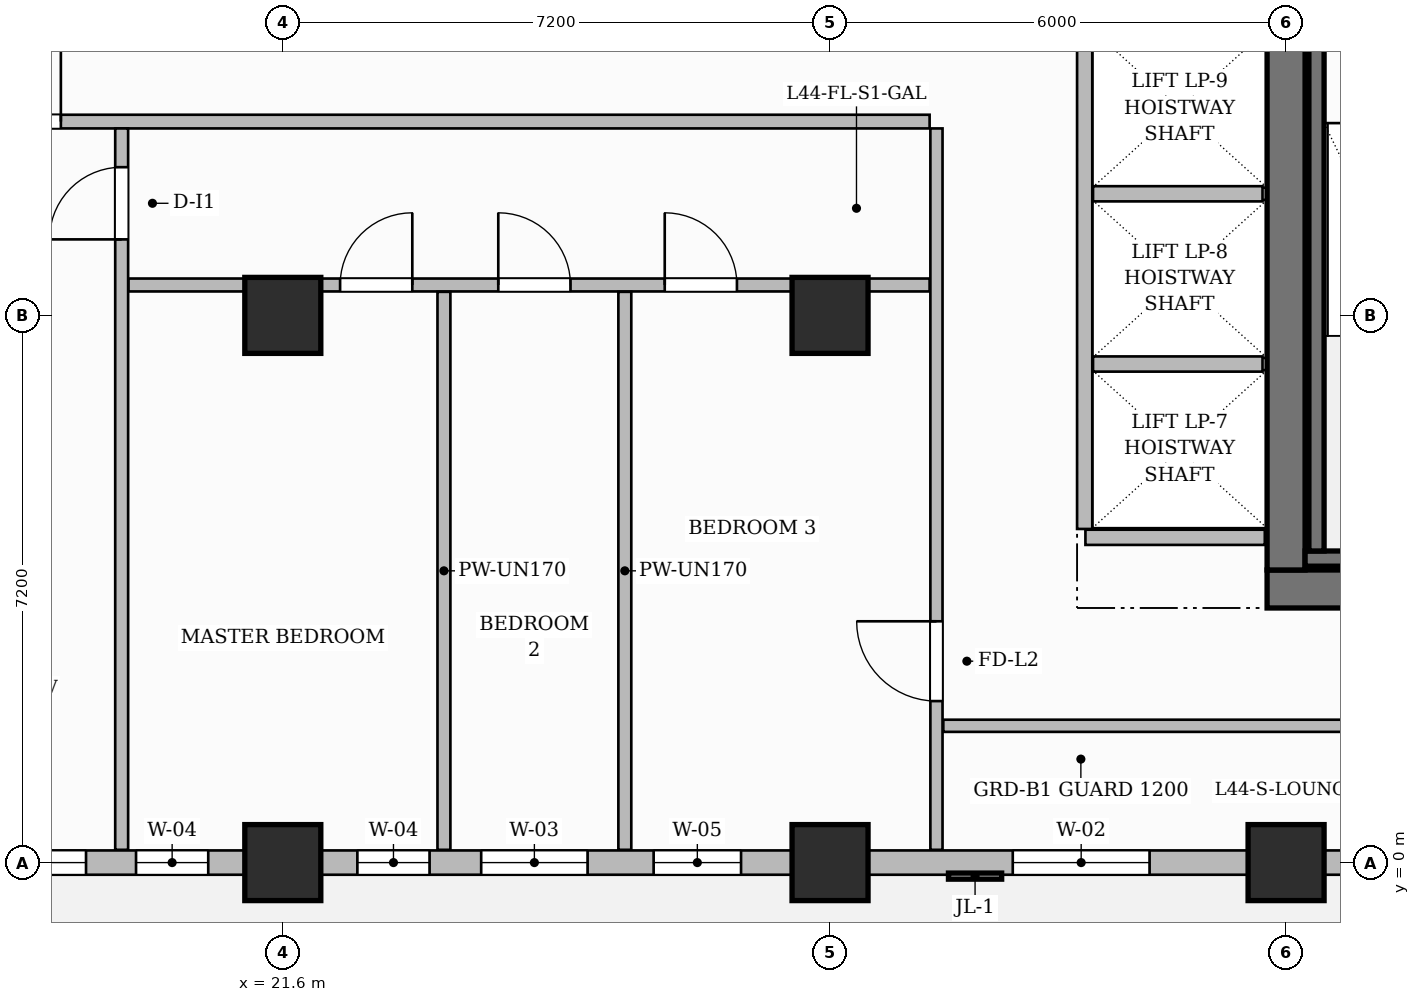
"""IFC4 building model, lengths in metres.
Left out: names, types, materials, properties, quantities, classifications, styles, units other than length and angle.
Written with IfcOpenShell. Run it as: python <this file> out.ifc"""

import sys

from ifc_helpers import new_model, si_unit, direction, frame, frame_2d, origin, origin_2d, place, context, subcontext, project, spatial, rectangle, extrude, source, transform, mapped, element, fill, save


model = new_model("IFC4")
c1 = context("Model", 3, precision=1e-05, world=origin(), true_north=direction((0.0, 1.0)))
c2 = subcontext(c1, "Body", "Model", "MODEL_VIEW")
j1 = project(units=[si_unit("LENGTHUNIT", "METRE"), si_unit("PLANEANGLEUNIT", "RADIAN")], contexts=[c1])
p1 = place(None, origin())
s1 = spatial("IfcSite", under=j1, at=p1, CompositionType="ELEMENT")
p2 = place(p1, origin())
s2 = spatial("IfcBuilding", under=s1, at=p2, CompositionType="ELEMENT")
p3 = place(p2, frame((0.0, 0.0, 177.25)))
s3 = spatial("IfcBuildingStorey", under=s2, at=p3, CompositionType="ELEMENT", Elevation=177.25)
p4 = place(p3, frame((34.55, 3.6, 0.0), z_axis=(0.0, 0.0, 1.0), x_axis=(1.0, 0.0, 0.0)))
e1 = element("IfcWall", 1, at=p4, inside=s3, PredefinedType="SHEAR", context=c2, shape_type="SweptSolid", body=[
    extrude(rectangle(XDim=15.5, YDim=0.5, at=frame_2d((7.75, 0.0))), origin(), (0.0, 0.0, 1.0), 3.85),
])
p5 = place(p4, frame((4.72, 0.0, 0.0)))
e2 = element("IfcOpeningElement", 2, at=p5, cuts=e1, PredefinedType="OPENING", context=c2, shape_type="SweptSolid", body=[
    extrude(rectangle(XDim=0.9, YDim=2.1, at=frame_2d((0.45, 1.05))), frame((0.0, 0.26, 0.0), z_axis=(0.0, -1.0, 0.0), x_axis=(1.0, 0.0, 0.0)), (0.0, 0.0, 1.0), 0.52),
])
p6 = place(p4, frame((7.1, 0.0, 0.0)))
e3 = element("IfcOpeningElement", 3, at=p6, cuts=e1, PredefinedType="OPENING", context=c2, shape_type="SweptSolid", body=[
    extrude(rectangle(XDim=0.9, YDim=2.1, at=frame_2d((0.45, 1.05))), frame((0.0, 0.26, 0.0), z_axis=(0.0, -1.0, 0.0), x_axis=(1.0, 0.0, 0.0)), (0.0, 0.0, 1.0), 0.52),
])
p7 = place(p3, frame((34.8, 3.85, 0.0), z_axis=(0.0, 0.0, 1.0), x_axis=(0.0, 1.0, 0.0)))
e4 = element("IfcWall", 4, at=p7, inside=s3, PredefinedType="SHEAR", context=c2, shape_type="SweptSolid", body=[
    extrude(rectangle(XDim=10.3, YDim=0.5, at=frame_2d((5.15, 0.0))), origin(), (0.0, 0.0, 1.0), 3.85),
])
m1 = source(origin(), c2, "Body", "SweptSolid", [
    extrude(rectangle(XDim=1.0, YDim=1.0, at=origin_2d()), origin(), (0.0, 0.0, 1.0), 3.85),
])
for number, where, z_axis, x_axis in (
    (5, (21.6, 0.0, 0.0), (0.0, 0.0, 1.0), (1.0, 0.0, 0.0)),
    (6, (21.6, 7.2, 0.0), (0.0, 0.0, 1.0), (1.0, 0.0, 0.0)),
    (7, (28.8, 0.0, 0.0), (0.0, 0.0, 1.0), (1.0, 0.0, 0.0)),
    (8, (28.8, 7.2, 0.0), (0.0, 0.0, 1.0), (1.0, 0.0, 0.0)),
    (9, (34.8, 0.0, 0.0), (0.0, 0.0, 1.0), (1.0, 0.0, 0.0)),
):
    element("IfcColumn", number, at=place(p3, frame(where, z_axis=z_axis, x_axis=x_axis)), inside=s3, PredefinedType="COLUMN", context=c2, shape_type="MappedRepresentation", body=[
        mapped(m1, transform((0.0, 0.0, 0.0), scale=1.0)),
    ])
p8 = place(p3, frame((35.05, 4.0, 0.0), z_axis=(0.0, 0.0, 1.0), x_axis=(1.0, 0.0, 0.0)))
e10 = element("IfcWall", 10, at=p8, inside=s3, PredefinedType="SHEAR", context=c2, shape_type="SweptSolid", body=[
    extrude(rectangle(XDim=3.19, YDim=0.2, at=frame_2d((1.595, 0.0))), origin(), (0.0, 0.0, 1.0), 3.85),
])
p9 = place(p3, frame((35.2, 4.1, 0.0), z_axis=(0.0, 0.0, 1.0), x_axis=(0.0, 1.0, 0.0)))
e11 = element("IfcWall", 11, at=p9, inside=s3, PredefinedType="SHEAR", context=c2, shape_type="SweptSolid", body=[
    extrude(rectangle(XDim=6.95, YDim=0.2, at=frame_2d((3.475, 0.0))), origin(), (0.0, 0.0, 1.0), 3.85),
])
p10 = place(p3, frame((32.16, 4.28, 0.0), z_axis=(0.0, 0.0, 1.0), x_axis=(1.0, 0.0, 0.0)))
e12 = element("IfcWall", 12, at=p10, inside=s3, PredefinedType="PARTITIONING", context=c2, shape_type="SweptSolid", body=[
    extrude(rectangle(XDim=2.36, YDim=0.2, at=frame_2d((1.18, 0.0))), origin(), (0.0, 0.0, 1.0), 3.6),
])
p11 = place(p3, frame((32.15, 4.39, 0.0), z_axis=(0.0, 0.0, 1.0), x_axis=(0.0, 1.0, 0.0)))
e13 = element("IfcWall", 13, at=p11, inside=s3, PredefinedType="PARTITIONING", context=c2, shape_type="SweptSolid", body=[
    extrude(rectangle(XDim=8.82, YDim=0.2, at=frame_2d((4.41, 0.0))), origin(), (0.0, 0.0, 1.0), 3.6),
])
for number, where, z_axis, x_axis in (
    (14, (32.26, 6.56, 0.0), (0.0, 0.0, 1.0), (1.0, 0.0, 0.0)),
    (15, (32.26, 8.8, 0.0), (0.0, 0.0, 1.0), (1.0, 0.0, 0.0)),
):
    element("IfcWall", number, at=place(p3, frame(where, z_axis=z_axis, x_axis=x_axis)), inside=s3, PredefinedType="PARTITIONING", context=c2, shape_type="SweptSolid", body=[
        extrude(rectangle(XDim=2.23, YDim=0.2, at=frame_2d((1.115, 0.0))), origin(), (0.0, 0.0, 1.0), 3.6),
    ])
p12 = place(p3, frame((14.568, 9.75, 0.0), z_axis=(0.0, 0.0, 1.0), x_axis=(1.0, 0.0, 0.0)))
e16 = element("IfcWall", 16, at=p12, inside=s3, PredefinedType="PARTITIONING", context=c2, shape_type="SweptSolid", body=[
    extrude(rectangle(XDim=15.542, YDim=0.18, at=frame_2d((7.771, 0.0))), origin(), (0.0, 0.0, 1.0), 3.6),
])
p13 = place(p12, frame((3.062, 0.0, 0.0)))
e17 = element("IfcOpeningElement", 17, at=p13, cuts=e16, PredefinedType="OPENING", context=c2, shape_type="SweptSolid", body=[
    extrude(rectangle(XDim=1.05, YDim=2.25, at=frame_2d((0.525, 1.125))), frame((0.0, 0.1, 0.0), z_axis=(0.0, -1.0, 0.0), x_axis=(1.0, 0.0, 0.0)), (0.0, 0.0, 1.0), 0.2),
])
p14 = place(p3, frame((30.2, 0.168, 0.0), z_axis=(0.0, 0.0, 1.0), x_axis=(0.0, 1.0, 0.0)))
e18 = element("IfcWall", 18, at=p14, inside=s3, PredefinedType="PARTITIONING", context=c2, shape_type="SweptSolid", body=[
    extrude(rectangle(XDim=9.492, YDim=0.16, at=frame_2d((4.746, 0.0))), origin(), (0.0, 0.0, 1.0), 3.6),
])
p15 = place(p14, frame((1.957, 0.0, 0.0)))
e19 = element("IfcOpeningElement", 19, at=p15, cuts=e18, PredefinedType="OPENING", context=c2, shape_type="SweptSolid", body=[
    extrude(rectangle(XDim=1.05, YDim=2.15, at=frame_2d((0.525, 1.075))), frame((0.0, 0.09, 0.0), z_axis=(0.0, -1.0, 0.0), x_axis=(1.0, 0.0, 0.0)), (0.0, 0.0, 1.0), 0.18),
])
p16 = place(p3, frame((30.29, 1.8, 0.0), z_axis=(0.0, 0.0, 1.0), x_axis=(1.0, 0.0, 0.0)))
e20 = element("IfcWall", 20, at=p16, inside=s3, PredefinedType="PARTITIONING", context=c2, shape_type="SweptSolid", body=[
    extrude(rectangle(XDim=19.37, YDim=0.16, at=frame_2d((9.685, 0.0))), origin(), (0.0, 0.0, 1.0), 3.6),
])
p17 = place(p16, frame((9.735, 0.0, 0.0)))
e21 = element("IfcOpeningElement", 21, at=p17, cuts=e20, PredefinedType="OPENING", context=c2, shape_type="SweptSolid", body=[
    extrude(rectangle(XDim=0.95, YDim=2.15, at=frame_2d((0.475, 1.075))), frame((0.0, 0.09, 0.0), z_axis=(0.0, -1.0, 0.0), x_axis=(1.0, 0.0, 0.0)), (0.0, 0.0, 1.0), 0.18),
])
p18 = place(p3, frame((19.48, 0.168, 0.0), z_axis=(0.0, 0.0, 1.0), x_axis=(0.0, 1.0, 0.0)))
e22 = element("IfcWall", 22, at=p18, inside=s3, PredefinedType="PARTITIONING", context=c2, shape_type="SweptSolid", body=[
    extrude(rectangle(XDim=9.492, YDim=0.17, at=frame_2d((4.746, 0.0))), origin(), (0.0, 0.0, 1.0), 3.6),
])
p19 = place(p18, frame((8.032, 0.0, 0.0)))
e23 = element("IfcOpeningElement", 23, at=p19, cuts=e22, PredefinedType="OPENING", context=c2, shape_type="SweptSolid", body=[
    extrude(rectangle(XDim=0.95, YDim=2.15, at=frame_2d((0.475, 1.075))), frame((0.0, 0.095, 0.0), z_axis=(0.0, -1.0, 0.0), x_axis=(1.0, 0.0, 0.0)), (0.0, 0.0, 1.0), 0.19),
])
p20 = place(p3, frame((19.57, 7.6, 0.0), z_axis=(0.0, 0.0, 1.0), x_axis=(1.0, 0.0, 0.0)))
e24 = element("IfcWall", 24, at=p20, inside=s3, PredefinedType="PARTITIONING", context=c2, shape_type="SweptSolid", body=[
    extrude(rectangle(XDim=10.54, YDim=0.17, at=frame_2d((5.27, 0.0))), origin(), (0.0, 0.0, 1.0), 3.6),
])
p21 = place(p20, frame((2.784, 0.0, 0.0)))
e25 = element("IfcOpeningElement", 25, at=p21, cuts=e24, PredefinedType="OPENING", context=c2, shape_type="SweptSolid", body=[
    extrude(rectangle(XDim=0.95, YDim=2.15, at=frame_2d((0.475, 1.075))), frame((0.0, 0.095, 0.0), z_axis=(0.0, -1.0, 0.0), x_axis=(1.0, 0.0, 0.0)), (0.0, 0.0, 1.0), 0.19),
])
p22 = place(p20, frame((4.865, 0.0, 0.0)))
e26 = element("IfcOpeningElement", 26, at=p22, cuts=e24, PredefinedType="OPENING", context=c2, shape_type="SweptSolid", body=[
    extrude(rectangle(XDim=0.95, YDim=2.15, at=frame_2d((0.475, 1.075))), frame((0.0, 0.095, 0.0), z_axis=(0.0, -1.0, 0.0), x_axis=(1.0, 0.0, 0.0)), (0.0, 0.0, 1.0), 0.19),
])
p23 = place(p20, frame((7.055, 0.0, 0.0)))
e27 = element("IfcOpeningElement", 27, at=p23, cuts=e24, PredefinedType="OPENING", context=c2, shape_type="SweptSolid", body=[
    extrude(rectangle(XDim=0.95, YDim=2.15, at=frame_2d((0.475, 1.075))), frame((0.0, 0.095, 0.0), z_axis=(0.0, -1.0, 0.0), x_axis=(1.0, 0.0, 0.0)), (0.0, 0.0, 1.0), 0.19),
])
for number, where, z_axis, x_axis in (
    (28, (23.72, 0.168, 0.0), (0.0, 0.0, 1.0), (0.0, 1.0, 0.0)),
    (29, (26.1, 0.168, 0.0), (0.0, 0.0, 1.0), (0.0, 1.0, 0.0)),
):
    element("IfcWall", number, at=place(p3, frame(where, z_axis=z_axis, x_axis=x_axis)), inside=s3, PredefinedType="PARTITIONING", context=c2, shape_type="SweptSolid", body=[
        extrude(rectangle(XDim=7.342, YDim=0.17, at=frame_2d((3.671, 0.0))), origin(), (0.0, 0.0, 1.0), 3.6),
    ])
p24 = place(p3, frame((14.4, 0.0, 0.0), z_axis=(0.0, 0.0, 1.0), x_axis=(1.0, 0.0, 0.0)))
e30 = element("IfcWall", 30, at=p24, inside=s3, PredefinedType="SOLIDWALL", context=c2, shape_type="SweptSolid", body=[
    extrude(rectangle(XDim=35.4, YDim=0.32, at=frame_2d((17.7, 0.0))), origin(), (0.0, 0.0, 1.0), 3.085),
])
p25 = place(p24, frame((0.85, 0.0, 0.0)))
e31 = element("IfcOpeningElement", 31, at=p25, cuts=e30, PredefinedType="OPENING", context=c2, shape_type="SweptSolid", body=[
    extrude(rectangle(XDim=1.2, YDim=2.2, at=frame_2d((0.6, 1.1))), frame((0.0, 0.17, 0.0), z_axis=(0.0, -1.0, 0.0), x_axis=(1.0, 0.0, 0.0)), (0.0, 0.0, 1.0), 0.34),
])
p26 = place(p24, frame((2.811, 0.0, 0.8)))
e32 = element("IfcOpeningElement", 32, at=p26, cuts=e30, PredefinedType="OPENING", context=c2, shape_type="SweptSolid", body=[
    extrude(rectangle(XDim=1.8, YDim=1.85, at=frame_2d((0.9, 0.925))), frame((0.0, 0.17, 0.0), z_axis=(0.0, -1.0, 0.0), x_axis=(1.0, 0.0, 0.0)), (0.0, 0.0, 1.0), 0.34),
])
p27 = place(p24, frame((5.269, 0.0, 0.8)))
e33 = element("IfcOpeningElement", 33, at=p27, cuts=e30, PredefinedType="OPENING", context=c2, shape_type="SweptSolid", body=[
    extrude(rectangle(XDim=0.95, YDim=1.75, at=frame_2d((0.475, 0.875))), frame((0.0, 0.17, 0.0), z_axis=(0.0, -1.0, 0.0), x_axis=(1.0, 0.0, 0.0)), (0.0, 0.0, 1.0), 0.34),
])
p28 = place(p24, frame((8.181, 0.0, 0.8)))
e34 = element("IfcOpeningElement", 34, at=p28, cuts=e30, PredefinedType="OPENING", context=c2, shape_type="SweptSolid", body=[
    extrude(rectangle(XDim=0.95, YDim=1.75, at=frame_2d((0.475, 0.875))), frame((0.0, 0.17, 0.0), z_axis=(0.0, -1.0, 0.0), x_axis=(1.0, 0.0, 0.0)), (0.0, 0.0, 1.0), 0.34),
])
p29 = place(p24, frame((9.81, 0.0, 0.8)))
e35 = element("IfcOpeningElement", 35, at=p29, cuts=e30, PredefinedType="OPENING", context=c2, shape_type="SweptSolid", body=[
    extrude(rectangle(XDim=1.4, YDim=1.85, at=frame_2d((0.7, 0.925))), frame((0.0, 0.17, 0.0), z_axis=(0.0, -1.0, 0.0), x_axis=(1.0, 0.0, 0.0)), (0.0, 0.0, 1.0), 0.34),
])
p30 = place(p24, frame((12.079, 0.0, 0.8)))
e36 = element("IfcOpeningElement", 36, at=p30, cuts=e30, PredefinedType="OPENING", context=c2, shape_type="SweptSolid", body=[
    extrude(rectangle(XDim=1.15, YDim=1.8, at=frame_2d((0.575, 0.9))), frame((0.0, 0.17, 0.0), z_axis=(0.0, -1.0, 0.0), x_axis=(1.0, 0.0, 0.0)), (0.0, 0.0, 1.0), 0.34),
])
p31 = place(p24, frame((16.804, 0.0, 0.8)))
e37 = element("IfcOpeningElement", 37, at=p31, cuts=e30, PredefinedType="OPENING", context=c2, shape_type="SweptSolid", body=[
    extrude(rectangle(XDim=1.8, YDim=1.85, at=frame_2d((0.9, 0.925))), frame((0.0, 0.17, 0.0), z_axis=(0.0, -1.0, 0.0), x_axis=(1.0, 0.0, 0.0)), (0.0, 0.0, 1.0), 0.34),
])
p32 = place(p24, frame((21.725, 0.0, 0.8)))
e38 = element("IfcOpeningElement", 38, at=p32, cuts=e30, PredefinedType="OPENING", context=c2, shape_type="SweptSolid", body=[
    extrude(rectangle(XDim=1.8, YDim=1.85, at=frame_2d((0.9, 0.925))), frame((0.0, 0.17, 0.0), z_axis=(0.0, -1.0, 0.0), x_axis=(1.0, 0.0, 0.0)), (0.0, 0.0, 1.0), 0.34),
])
p33 = place(p24, frame((24.475, 0.0, 0.8)))
e39 = element("IfcOpeningElement", 39, at=p33, cuts=e30, PredefinedType="OPENING", context=c2, shape_type="SweptSolid", body=[
    extrude(rectangle(XDim=1.8, YDim=1.85, at=frame_2d((0.9, 0.925))), frame((0.0, 0.17, 0.0), z_axis=(0.0, -1.0, 0.0), x_axis=(1.0, 0.0, 0.0)), (0.0, 0.0, 1.0), 0.34),
])
p34 = place(p24, frame((29.075, 0.0, 0.8)))
e40 = element("IfcOpeningElement", 40, at=p34, cuts=e30, PredefinedType="OPENING", context=c2, shape_type="SweptSolid", body=[
    extrude(rectangle(XDim=1.8, YDim=1.85, at=frame_2d((0.9, 0.925))), frame((0.0, 0.17, 0.0), z_axis=(0.0, -1.0, 0.0), x_axis=(1.0, 0.0, 0.0)), (0.0, 0.0, 1.0), 0.34),
])
p35 = place(p24, frame((32.125, 0.0, 0.8)))
e41 = element("IfcOpeningElement", 41, at=p35, cuts=e30, PredefinedType="OPENING", context=c2, shape_type="SweptSolid", body=[
    extrude(rectangle(XDim=1.8, YDim=1.85, at=frame_2d((0.9, 0.925))), frame((0.0, 0.17, 0.0), z_axis=(0.0, -1.0, 0.0), x_axis=(1.0, 0.0, 0.0)), (0.0, 0.0, 1.0), 0.34),
])
m2 = source(origin(), c2, "Body", "SweptSolid", [
    extrude(rectangle(XDim=1.05, YDim=2.15, at=frame_2d((0.525, 1.075))), frame((0.0, 0.025, 0.0), z_axis=(0.0, -1.0, 0.0), x_axis=(1.0, 0.0, 0.0)), (0.0, 0.0, 1.0), 0.05),
])
p36 = place(p15, origin())
e42 = element("IfcDoor", 42, at=p36, inside=s3, OperationType="SINGLE_SWING_RIGHT", PredefinedType="DOOR", context=c2, shape_type="MappedRepresentation", body=[
    mapped(m2, transform((0.0, 0.0, 0.0), scale=1.0)),
])
fill(e19, e42)
m3 = source(origin(), c2, "Body", "SweptSolid", [
    extrude(rectangle(XDim=1.05, YDim=2.25, at=frame_2d((0.525, 1.125))), frame((0.0, 0.025, 0.0), z_axis=(0.0, -1.0, 0.0), x_axis=(1.0, 0.0, 0.0)), (0.0, 0.0, 1.0), 0.05),
])
p37 = place(p13, origin())
e43 = element("IfcDoor", 43, at=p37, inside=s3, OperationType="SINGLE_SWING_RIGHT", PredefinedType="DOOR", context=c2, shape_type="MappedRepresentation", body=[
    mapped(m3, transform((0.0, 0.0, 0.0), scale=1.0)),
])
fill(e17, e43)
m4 = source(origin(), c2, "Body", "SweptSolid", [
    extrude(rectangle(XDim=0.95, YDim=2.15, at=frame_2d((0.475, 1.075))), frame((0.0, 0.025, 0.0), z_axis=(0.0, -1.0, 0.0), x_axis=(1.0, 0.0, 0.0)), (0.0, 0.0, 1.0), 0.05),
])
p38 = place(p19, origin())
e44 = element("IfcDoor", 44, at=p38, inside=s3, OperationType="SINGLE_SWING_LEFT", PredefinedType="DOOR", context=c2, shape_type="MappedRepresentation", body=[
    mapped(m4, transform((0.0, 0.0, 0.0), scale=1.0)),
])
fill(e23, e44)
p39 = place(p21, origin())
e45 = element("IfcDoor", 45, at=p39, inside=s3, OperationType="SINGLE_SWING_RIGHT", PredefinedType="DOOR", context=c2, shape_type="MappedRepresentation", body=[
    mapped(m4, transform((0.0, 0.0, 0.0), scale=1.0)),
])
fill(e25, e45)
p40 = place(p22, origin())
e46 = element("IfcDoor", 46, at=p40, inside=s3, OperationType="SINGLE_SWING_LEFT", PredefinedType="DOOR", context=c2, shape_type="MappedRepresentation", body=[
    mapped(m4, transform((0.0, 0.0, 0.0), scale=1.0)),
])
fill(e26, e46)
p41 = place(p23, origin())
e47 = element("IfcDoor", 47, at=p41, inside=s3, OperationType="SINGLE_SWING_LEFT", PredefinedType="DOOR", context=c2, shape_type="MappedRepresentation", body=[
    mapped(m4, transform((0.0, 0.0, 0.0), scale=1.0)),
])
fill(e27, e47)
m5 = source(origin(), c2, "Body", "SweptSolid", [
    extrude(rectangle(XDim=1.8, YDim=1.85, at=frame_2d((0.9, 0.925))), frame((0.0, 0.03, 0.0), z_axis=(0.0, -1.0, 0.0), x_axis=(1.0, 0.0, 0.0)), (0.0, 0.0, 1.0), 0.06),
])
p42 = place(p26, origin())
e48 = element("IfcWindow", 48, at=p42, inside=s3, PartitioningType="DOUBLE_PANEL_VERTICAL", PredefinedType="WINDOW", context=c2, shape_type="MappedRepresentation", body=[
    mapped(m5, transform((0.0, 0.0, 0.0), scale=1.0)),
])
fill(e32, e48)
m6 = source(origin(), c2, "Body", "SweptSolid", [
    extrude(rectangle(XDim=0.95, YDim=1.75, at=frame_2d((0.475, 0.875))), frame((0.0, 0.03, 0.0), z_axis=(0.0, -1.0, 0.0), x_axis=(1.0, 0.0, 0.0)), (0.0, 0.0, 1.0), 0.06),
])
p43 = place(p27, origin())
e49 = element("IfcWindow", 49, at=p43, inside=s3, PartitioningType="SINGLE_PANEL", PredefinedType="WINDOW", context=c2, shape_type="MappedRepresentation", body=[
    mapped(m6, transform((0.0, 0.0, 0.0), scale=1.0)),
])
fill(e33, e49)
p44 = place(p28, origin())
e50 = element("IfcWindow", 50, at=p44, inside=s3, PartitioningType="SINGLE_PANEL", PredefinedType="WINDOW", context=c2, shape_type="MappedRepresentation", body=[
    mapped(m6, transform((0.0, 0.0, 0.0), scale=1.0)),
])
fill(e34, e50)
m7 = source(origin(), c2, "Body", "SweptSolid", [
    extrude(rectangle(XDim=1.4, YDim=1.85, at=frame_2d((0.7, 0.925))), frame((0.0, 0.03, 0.0), z_axis=(0.0, -1.0, 0.0), x_axis=(1.0, 0.0, 0.0)), (0.0, 0.0, 1.0), 0.06),
])
p45 = place(p29, origin())
e51 = element("IfcWindow", 51, at=p45, inside=s3, PartitioningType="SINGLE_PANEL", PredefinedType="WINDOW", context=c2, shape_type="MappedRepresentation", body=[
    mapped(m7, transform((0.0, 0.0, 0.0), scale=1.0)),
])
fill(e35, e51)
m8 = source(origin(), c2, "Body", "SweptSolid", [
    extrude(rectangle(XDim=1.15, YDim=1.8, at=frame_2d((0.575, 0.9))), frame((0.0, 0.03, 0.0), z_axis=(0.0, -1.0, 0.0), x_axis=(1.0, 0.0, 0.0)), (0.0, 0.0, 1.0), 0.06),
])
p46 = place(p30, origin())
e52 = element("IfcWindow", 52, at=p46, inside=s3, PartitioningType="SINGLE_PANEL", PredefinedType="WINDOW", context=c2, shape_type="MappedRepresentation", body=[
    mapped(m8, transform((0.0, 0.0, 0.0), scale=1.0)),
])
fill(e36, e52)
p47 = place(p31, origin())
e53 = element("IfcWindow", 53, at=p47, inside=s3, PartitioningType="DOUBLE_PANEL_VERTICAL", PredefinedType="WINDOW", context=c2, shape_type="MappedRepresentation", body=[
    mapped(m5, transform((0.0, 0.0, 0.0), scale=1.0)),
])
fill(e37, e53)
save(model, sys.argv[1])
